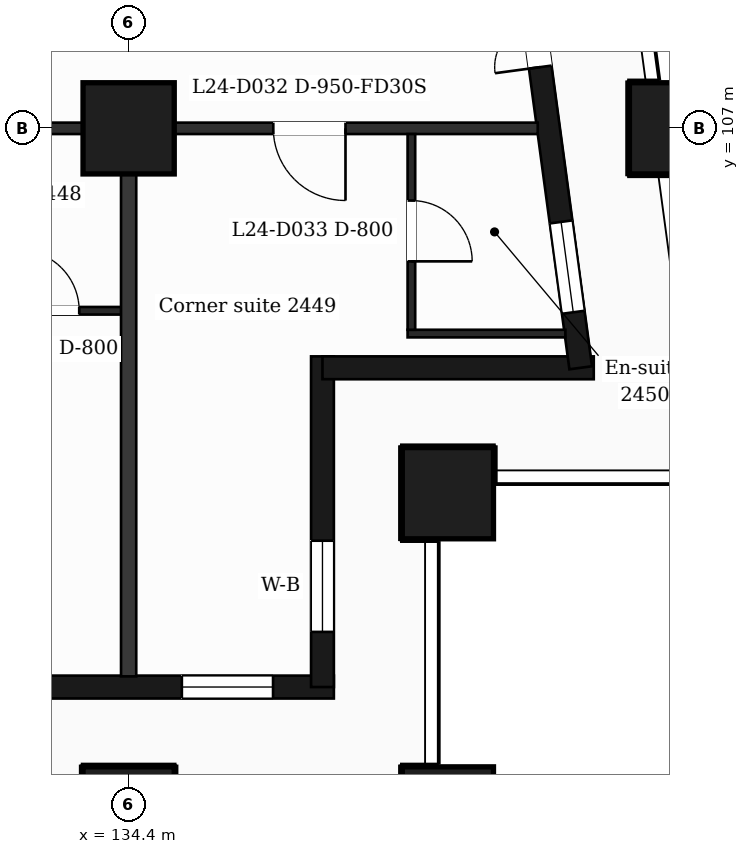
"""IFC4 building model, lengths in metres.
Left out: names, types, materials, properties, quantities, classifications, styles, units other than length and angle.
Written with IfcOpenShell. Run it as: python <this file> out.ifc"""

import sys

from ifc_helpers import new_model, si_unit, direction, frame, frame_2d, origin, origin_2d, place, context, subcontext, project, spatial, rectangle, extrude, element, fill, save


model = new_model("IFC4")
c1 = context("Model", 3, precision=1e-05, world=origin(), true_north=direction((0.0, 1.0)))
c2 = subcontext(c1, "Body", "Model", "MODEL_VIEW")
j1 = project(units=[si_unit("LENGTHUNIT", "METRE"), si_unit("PLANEANGLEUNIT", "RADIAN")], contexts=[c1])
p1 = place(None, origin())
s1 = spatial("IfcSite", under=j1, at=p1, CompositionType="ELEMENT")
p2 = place(p1, origin())
s2 = spatial("IfcBuilding", under=s1, at=p2, CompositionType="ELEMENT")
p3 = place(p2, frame((0.0, 0.0, 105.8)))
s3 = spatial("IfcBuildingStorey", under=s2, at=p3, CompositionType="ELEMENT", Elevation=105.8)
for number, where, z_axis, x_axis in (
    (1, (134.4, 98.0, 0.0), (0.0, 0.0, 1.0), (1.0, 0.0, 0.0)),
    (2, (138.6, 98.0, 0.0), (0.0, 0.0, 1.0), (1.0, 0.0, 0.0)),
    (3, (138.6, 102.2, 0.0), (0.0, 0.0, 1.0), (1.0, 0.0, 0.0)),
    (4, (134.4, 107.0, 0.0), (0.0, 0.0, 1.0), (1.0, 0.0, 0.0)),
    (5, (141.588, 107.0, 0.0), (0.0, 0.0, 1.0), (1.0, 0.0, 0.0)),
):
    element("IfcColumn", number, at=place(p3, frame(where, z_axis=z_axis, x_axis=x_axis)), inside=s3, PredefinedType="COLUMN", context=c2, shape_type="SweptSolid", body=[
        extrude(rectangle(XDim=1.2, YDim=1.2, at=origin_2d()), origin(), (0.0, 0.0, 1.0), 3.7),
    ])
p4 = place(p3, frame((89.85, 99.65, 0.0), z_axis=(0.0, 0.0, 1.0), x_axis=(1.0, 0.0, 0.0)))
e6 = element("IfcWall", 6, at=p4, inside=s3, PredefinedType="SOLIDWALL", context=c2, shape_type="SweptSolid", body=[
    extrude(rectangle(XDim=47.25, YDim=0.3, at=frame_2d((23.625, 0.0))), origin(), (0.0, 0.0, 1.0), 3.38),
])
p5 = place(p4, frame((0.725, 0.0, 0.9)))
e7 = element("IfcOpeningElement", 7, at=p5, cuts=e6, PredefinedType="OPENING", context=c2, shape_type="SweptSolid", body=[
    extrude(rectangle(XDim=1.2, YDim=2.1, at=frame_2d((0.6, 1.05))), frame((0.0, 0.16, 0.0), z_axis=(0.0, -1.0, 0.0), x_axis=(1.0, 0.0, 0.0)), (0.0, 0.0, 1.0), 0.32),
])
p6 = place(p4, frame((3.45, 0.0, 0.9)))
e8 = element("IfcOpeningElement", 8, at=p6, cuts=e6, PredefinedType="OPENING", context=c2, shape_type="SweptSolid", body=[
    extrude(rectangle(XDim=2.4, YDim=2.1, at=frame_2d((1.2, 1.05))), frame((0.0, 0.16, 0.0), z_axis=(0.0, -1.0, 0.0), x_axis=(1.0, 0.0, 0.0)), (0.0, 0.0, 1.0), 0.32),
])
p7 = place(p4, frame((7.65, 0.0, 0.9)))
e9 = element("IfcOpeningElement", 9, at=p7, cuts=e6, PredefinedType="OPENING", context=c2, shape_type="SweptSolid", body=[
    extrude(rectangle(XDim=2.4, YDim=2.1, at=frame_2d((1.2, 1.05))), frame((0.0, 0.16, 0.0), z_axis=(0.0, -1.0, 0.0), x_axis=(1.0, 0.0, 0.0)), (0.0, 0.0, 1.0), 0.32),
])
p8 = place(p4, frame((12.45, 0.0, 0.9)))
e10 = element("IfcOpeningElement", 10, at=p8, cuts=e6, PredefinedType="OPENING", context=c2, shape_type="SweptSolid", body=[
    extrude(rectangle(XDim=1.2, YDim=2.1, at=frame_2d((0.6, 1.05))), frame((0.0, 0.16, 0.0), z_axis=(0.0, -1.0, 0.0), x_axis=(1.0, 0.0, 0.0)), (0.0, 0.0, 1.0), 0.32),
])
p9 = place(p4, frame((16.65, 0.0, 0.9)))
e11 = element("IfcOpeningElement", 11, at=p9, cuts=e6, PredefinedType="OPENING", context=c2, shape_type="SweptSolid", body=[
    extrude(rectangle(XDim=1.2, YDim=2.1, at=frame_2d((0.6, 1.05))), frame((0.0, 0.16, 0.0), z_axis=(0.0, -1.0, 0.0), x_axis=(1.0, 0.0, 0.0)), (0.0, 0.0, 1.0), 0.32),
])
p10 = place(p4, frame((19.95, 0.0, 0.0)))
e12 = element("IfcOpeningElement", 12, at=p10, cuts=e6, PredefinedType="OPENING", context=c2, shape_type="SweptSolid", body=[
    extrude(rectangle(XDim=1.2, YDim=2.4, at=frame_2d((0.6, 1.2))), frame((0.0, 0.16, 0.0), z_axis=(0.0, -1.0, 0.0), x_axis=(1.0, 0.0, 0.0)), (0.0, 0.0, 1.0), 0.32),
])
p11 = place(p4, frame((21.75, 0.0, 0.9)))
e13 = element("IfcOpeningElement", 13, at=p11, cuts=e6, PredefinedType="OPENING", context=c2, shape_type="SweptSolid", body=[
    extrude(rectangle(XDim=1.2, YDim=2.1, at=frame_2d((0.6, 1.05))), frame((0.0, 0.16, 0.0), z_axis=(0.0, -1.0, 0.0), x_axis=(1.0, 0.0, 0.0)), (0.0, 0.0, 1.0), 0.32),
])
p12 = place(p4, frame((24.45, 0.0, 0.9)))
e14 = element("IfcOpeningElement", 14, at=p12, cuts=e6, PredefinedType="OPENING", context=c2, shape_type="SweptSolid", body=[
    extrude(rectangle(XDim=2.4, YDim=2.1, at=frame_2d((1.2, 1.05))), frame((0.0, 0.16, 0.0), z_axis=(0.0, -1.0, 0.0), x_axis=(1.0, 0.0, 0.0)), (0.0, 0.0, 1.0), 0.32),
])
p13 = place(p4, frame((28.35, 0.0, 0.0)))
e15 = element("IfcOpeningElement", 15, at=p13, cuts=e6, PredefinedType="OPENING", context=c2, shape_type="SweptSolid", body=[
    extrude(rectangle(XDim=1.2, YDim=2.4, at=frame_2d((0.6, 1.2))), frame((0.0, 0.16, 0.0), z_axis=(0.0, -1.0, 0.0), x_axis=(1.0, 0.0, 0.0)), (0.0, 0.0, 1.0), 0.32),
])
p14 = place(p4, frame((30.15, 0.0, 0.9)))
e16 = element("IfcOpeningElement", 16, at=p14, cuts=e6, PredefinedType="OPENING", context=c2, shape_type="SweptSolid", body=[
    extrude(rectangle(XDim=1.2, YDim=2.1, at=frame_2d((0.6, 1.05))), frame((0.0, 0.16, 0.0), z_axis=(0.0, -1.0, 0.0), x_axis=(1.0, 0.0, 0.0)), (0.0, 0.0, 1.0), 0.32),
])
p15 = place(p4, frame((32.85, 0.0, 0.9)))
e17 = element("IfcOpeningElement", 17, at=p15, cuts=e6, PredefinedType="OPENING", context=c2, shape_type="SweptSolid", body=[
    extrude(rectangle(XDim=2.4, YDim=2.1, at=frame_2d((1.2, 1.05))), frame((0.0, 0.16, 0.0), z_axis=(0.0, -1.0, 0.0), x_axis=(1.0, 0.0, 0.0)), (0.0, 0.0, 1.0), 0.32),
])
p16 = place(p4, frame((37.05, 0.0, 0.9)))
e18 = element("IfcOpeningElement", 18, at=p16, cuts=e6, PredefinedType="OPENING", context=c2, shape_type="SweptSolid", body=[
    extrude(rectangle(XDim=2.4, YDim=2.1, at=frame_2d((1.2, 1.05))), frame((0.0, 0.16, 0.0), z_axis=(0.0, -1.0, 0.0), x_axis=(1.0, 0.0, 0.0)), (0.0, 0.0, 1.0), 0.32),
])
p17 = place(p4, frame((41.85, 0.0, 0.9)))
e19 = element("IfcOpeningElement", 19, at=p17, cuts=e6, PredefinedType="OPENING", context=c2, shape_type="SweptSolid", body=[
    extrude(rectangle(XDim=1.2, YDim=2.1, at=frame_2d((0.6, 1.05))), frame((0.0, 0.16, 0.0), z_axis=(0.0, -1.0, 0.0), x_axis=(1.0, 0.0, 0.0)), (0.0, 0.0, 1.0), 0.32),
])
p18 = place(p4, frame((45.25, 0.0, 0.9)))
e20 = element("IfcOpeningElement", 20, at=p18, cuts=e6, PredefinedType="OPENING", context=c2, shape_type="SweptSolid", body=[
    extrude(rectangle(XDim=1.2, YDim=2.1, at=frame_2d((0.6, 1.05))), frame((0.0, 0.16, 0.0), z_axis=(0.0, -1.0, 0.0), x_axis=(1.0, 0.0, 0.0)), (0.0, 0.0, 1.0), 0.32),
])
p19 = place(p3, frame((136.95, 99.65, 0.0), z_axis=(0.0, 0.0, 1.0), x_axis=(0.0, 1.0, 0.0)))
e21 = element("IfcWall", 21, at=p19, inside=s3, PredefinedType="SOLIDWALL", context=c2, shape_type="SweptSolid", body=[
    extrude(rectangle(XDim=4.35, YDim=0.3, at=frame_2d((2.175, 0.0))), origin(), (0.0, 0.0, 1.0), 3.38),
])
p20 = place(p19, frame((0.725, 0.0, 0.9)))
e22 = element("IfcOpeningElement", 22, at=p20, cuts=e21, PredefinedType="OPENING", context=c2, shape_type="SweptSolid", body=[
    extrude(rectangle(XDim=1.2, YDim=2.1, at=frame_2d((0.6, 1.05))), frame((0.0, 0.16, 0.0), z_axis=(0.0, -1.0, 0.0), x_axis=(1.0, 0.0, 0.0)), (0.0, 0.0, 1.0), 0.32),
])
p21 = place(p3, frame((136.95, 103.85, 0.0), z_axis=(0.0, 0.0, 1.0), x_axis=(1.0, 0.0, 0.0)))
e23 = element("IfcWall", 23, at=p21, inside=s3, PredefinedType="SOLIDWALL", context=c2, shape_type="SweptSolid", body=[
    extrude(rectangle(XDim=3.569, YDim=0.3, at=frame_2d((1.785, 0.0))), origin(), (0.0, 0.0, 1.0), 3.38),
])
p22 = place(p3, frame((140.348, 103.85, 0.0), z_axis=(0.0, 0.0, 1.0), x_axis=(-0.133431549479, 0.991058031401, 0.0)))
e24 = element("IfcWall", 24, at=p22, inside=s3, PredefinedType="SOLIDWALL", context=c2, shape_type="SweptSolid", body=[
    extrude(rectangle(XDim=6.609, YDim=0.3, at=frame_2d((3.304, 0.0))), origin(), (0.0, 0.0, 1.0), 3.38),
])
p23 = place(p22, frame((0.737, 0.0, 0.9)))
e25 = element("IfcOpeningElement", 25, at=p23, cuts=e24, PredefinedType="OPENING", context=c2, shape_type="SweptSolid", body=[
    extrude(rectangle(XDim=1.2, YDim=2.1, at=frame_2d((0.6, 1.05))), frame((0.0, 0.16, 0.0), z_axis=(0.0, -1.0, 0.0), x_axis=(1.0, 0.0, 0.0)), (0.0, 0.0, 1.0), 0.32),
])
p24 = place(p22, frame((3.991, 0.0, 0.0)))
e26 = element("IfcOpeningElement", 26, at=p24, cuts=e24, PredefinedType="OPENING", context=c2, shape_type="SweptSolid", body=[
    extrude(rectangle(XDim=1.2, YDim=2.4, at=frame_2d((0.6, 1.2))), frame((0.0, 0.16, 0.0), z_axis=(0.0, -1.0, 0.0), x_axis=(1.0, 0.0, 0.0)), (0.0, 0.0, 1.0), 0.32),
])
p25 = place(p3, frame((138.07, 104.3, 0.0), z_axis=(0.0, 0.0, 1.0), x_axis=(1.0, 0.0, 0.0)))
e27 = element("IfcWall", 27, at=p25, inside=s3, PredefinedType="PARTITIONING", context=c2, shape_type="SweptSolid", body=[
    extrude(rectangle(XDim=2.076, YDim=0.1, at=frame_2d((1.038, 0.0))), origin(), (0.0, 0.0, 1.0), 3.38),
])
p26 = place(p3, frame((131.65, 104.6, 0.0), z_axis=(0.0, 0.0, 1.0), x_axis=(1.0, 0.0, 0.0)))
e28 = element("IfcWall", 28, at=p26, inside=s3, PredefinedType="PARTITIONING", context=c2, shape_type="SweptSolid", body=[
    extrude(rectangle(XDim=2.75, YDim=0.1, at=frame_2d((1.375, 0.0))), origin(), (0.0, 0.0, 1.0), 3.38),
])
p27 = place(p26, frame((1.3, 0.0, 0.0)))
e29 = element("IfcOpeningElement", 29, at=p27, cuts=e28, PredefinedType="OPENING", context=c2, shape_type="SweptSolid", body=[
    extrude(rectangle(XDim=0.8, YDim=2.1, at=frame_2d((0.4, 1.05))), frame((0.0, 0.06, 0.0), z_axis=(0.0, -1.0, 0.0), x_axis=(1.0, 0.0, 0.0)), (0.0, 0.0, 1.0), 0.12),
])
p28 = place(p3, frame((87.018, 107.0, 0.0), z_axis=(0.0, 0.0, 1.0), x_axis=(1.0, 0.0, 0.0)))
e30 = element("IfcWall", 30, at=p28, inside=s3, PredefinedType="PARTITIONING", context=c2, shape_type="SweptSolid", body=[
    extrude(rectangle(XDim=52.765, YDim=0.15, at=frame_2d((26.382, 0.0))), origin(), (0.0, 0.0, 1.0), 3.38),
])
p29 = place(p28, frame((1.276, 0.0, 0.0)))
e31 = element("IfcOpeningElement", 31, at=p29, cuts=e30, PredefinedType="OPENING", context=c2, shape_type="SweptSolid", body=[
    extrude(rectangle(XDim=0.95, YDim=2.1, at=frame_2d((0.475, 1.05))), frame((0.0, 0.085, 0.0), z_axis=(0.0, -1.0, 0.0), x_axis=(1.0, 0.0, 0.0)), (0.0, 0.0, 1.0), 0.17),
])
p30 = place(p28, frame((6.152, 0.0, 0.0)))
e32 = element("IfcOpeningElement", 32, at=p30, cuts=e30, PredefinedType="OPENING", context=c2, shape_type="SweptSolid", body=[
    extrude(rectangle(XDim=0.95, YDim=2.1, at=frame_2d((0.475, 1.05))), frame((0.0, 0.085, 0.0), z_axis=(0.0, -1.0, 0.0), x_axis=(1.0, 0.0, 0.0)), (0.0, 0.0, 1.0), 0.17),
])
p31 = place(p28, frame((14.59, 0.0, 0.0)))
e33 = element("IfcOpeningElement", 33, at=p31, cuts=e30, PredefinedType="OPENING", context=c2, shape_type="SweptSolid", body=[
    extrude(rectangle(XDim=0.95, YDim=2.1, at=frame_2d((0.475, 1.05))), frame((0.0, 0.085, 0.0), z_axis=(0.0, -1.0, 0.0), x_axis=(1.0, 0.0, 0.0)), (0.0, 0.0, 1.0), 0.17),
])
p32 = place(p28, frame((18.257, 0.0, 0.0)))
e34 = element("IfcOpeningElement", 34, at=p32, cuts=e30, PredefinedType="OPENING", context=c2, shape_type="SweptSolid", body=[
    extrude(rectangle(XDim=0.95, YDim=2.1, at=frame_2d((0.475, 1.05))), frame((0.0, 0.085, 0.0), z_axis=(0.0, -1.0, 0.0), x_axis=(1.0, 0.0, 0.0)), (0.0, 0.0, 1.0), 0.17),
])
p33 = place(p28, frame((26.672, 0.0, 0.0)))
e35 = element("IfcOpeningElement", 35, at=p33, cuts=e30, PredefinedType="OPENING", context=c2, shape_type="SweptSolid", body=[
    extrude(rectangle(XDim=0.95, YDim=2.1, at=frame_2d((0.475, 1.05))), frame((0.0, 0.085, 0.0), z_axis=(0.0, -1.0, 0.0), x_axis=(1.0, 0.0, 0.0)), (0.0, 0.0, 1.0), 0.17),
])
p34 = place(p28, frame((31.392, 0.0, 0.0)))
e36 = element("IfcOpeningElement", 36, at=p34, cuts=e30, PredefinedType="OPENING", context=c2, shape_type="SweptSolid", body=[
    extrude(rectangle(XDim=0.95, YDim=2.1, at=frame_2d((0.475, 1.05))), frame((0.0, 0.085, 0.0), z_axis=(0.0, -1.0, 0.0), x_axis=(1.0, 0.0, 0.0)), (0.0, 0.0, 1.0), 0.17),
])
p35 = place(p28, frame((37.182, 0.0, 0.0)))
e37 = element("IfcOpeningElement", 37, at=p35, cuts=e30, PredefinedType="OPENING", context=c2, shape_type="SweptSolid", body=[
    extrude(rectangle(XDim=0.95, YDim=2.1, at=frame_2d((0.475, 1.05))), frame((0.0, 0.085, 0.0), z_axis=(0.0, -1.0, 0.0), x_axis=(1.0, 0.0, 0.0)), (0.0, 0.0, 1.0), 0.17),
])
p36 = place(p28, frame((41.762, 0.0, 0.0)))
e38 = element("IfcOpeningElement", 38, at=p36, cuts=e30, PredefinedType="OPENING", context=c2, shape_type="SweptSolid", body=[
    extrude(rectangle(XDim=0.95, YDim=2.1, at=frame_2d((0.475, 1.05))), frame((0.0, 0.085, 0.0), z_axis=(0.0, -1.0, 0.0), x_axis=(1.0, 0.0, 0.0)), (0.0, 0.0, 1.0), 0.17),
])
p37 = place(p28, frame((49.285, 0.0, 0.0)))
e39 = element("IfcOpeningElement", 39, at=p37, cuts=e30, PredefinedType="OPENING", context=c2, shape_type="SweptSolid", body=[
    extrude(rectangle(XDim=0.95, YDim=2.1, at=frame_2d((0.475, 1.05))), frame((0.0, 0.085, 0.0), z_axis=(0.0, -1.0, 0.0), x_axis=(1.0, 0.0, 0.0)), (0.0, 0.0, 1.0), 0.17),
])
p38 = place(p3, frame((134.4, 99.79, 0.0), z_axis=(0.0, 0.0, 1.0), x_axis=(0.0, 1.0, 0.0)))
e40 = element("IfcWall", 40, at=p38, inside=s3, PredefinedType="PARTITIONING", context=c2, shape_type="SweptSolid", body=[
    extrude(rectangle(XDim=7.135, YDim=0.2, at=frame_2d((3.567, 0.0))), origin(), (0.0, 0.0, 1.0), 3.38),
])
p39 = place(p3, frame((138.12, 104.35, 0.0), z_axis=(0.0, 0.0, 1.0), x_axis=(0.0, 1.0, 0.0)))
e41 = element("IfcWall", 41, at=p39, inside=s3, PredefinedType="PARTITIONING", context=c2, shape_type="SweptSolid", body=[
    extrude(rectangle(XDim=2.575, YDim=0.1, at=frame_2d((1.288, 0.0))), origin(), (0.0, 0.0, 1.0), 3.38),
])
p40 = place(p39, frame((0.9, 0.0, 0.0)))
e42 = element("IfcOpeningElement", 42, at=p40, cuts=e41, PredefinedType="OPENING", context=c2, shape_type="SweptSolid", body=[
    extrude(rectangle(XDim=0.8, YDim=2.1, at=frame_2d((0.4, 1.05))), frame((0.0, 0.06, 0.0), z_axis=(0.0, -1.0, 0.0), x_axis=(1.0, 0.0, 0.0)), (0.0, 0.0, 1.0), 0.12),
])
p41 = place(p18, origin())
e43 = element("IfcWindow", 43, at=p41, inside=s3, PartitioningType="SINGLE_PANEL", PredefinedType="WINDOW", context=c2, shape_type="SweptSolid", body=[
    extrude(rectangle(XDim=1.2, YDim=2.1, at=frame_2d((0.6, 1.05))), frame((0.0, 0.03, 0.0), z_axis=(0.0, -1.0, 0.0), x_axis=(1.0, 0.0, 0.0)), (0.0, 0.0, 1.0), 0.06),
])
fill(e20, e43)
p42 = place(p20, origin())
e44 = element("IfcWindow", 44, at=p42, inside=s3, PartitioningType="SINGLE_PANEL", PredefinedType="WINDOW", context=c2, shape_type="SweptSolid", body=[
    extrude(rectangle(XDim=1.2, YDim=2.1, at=frame_2d((0.6, 1.05))), frame((0.0, 0.03, 0.0), z_axis=(0.0, -1.0, 0.0), x_axis=(1.0, 0.0, 0.0)), (0.0, 0.0, 1.0), 0.06),
])
fill(e22, e44)
p43 = place(p23, origin())
e45 = element("IfcWindow", 45, at=p43, inside=s3, PartitioningType="SINGLE_PANEL", PredefinedType="WINDOW", context=c2, shape_type="SweptSolid", body=[
    extrude(rectangle(XDim=1.2, YDim=2.1, at=frame_2d((0.6, 1.05))), frame((0.0, 0.03, 0.0), z_axis=(0.0, -1.0, 0.0), x_axis=(1.0, 0.0, 0.0)), (0.0, 0.0, 1.0), 0.06),
])
fill(e25, e45)
p44 = place(p24, origin())
e46 = element("IfcDoor", 46, at=p44, inside=s3, OperationType="DOUBLE_DOOR_SINGLE_SWING", PredefinedType="DOOR", context=c2, shape_type="SweptSolid", body=[
    extrude(rectangle(XDim=1.2, YDim=2.4, at=frame_2d((0.6, 1.2))), frame((0.0, 0.025, 0.0), z_axis=(0.0, -1.0, 0.0), x_axis=(1.0, 0.0, 0.0)), (0.0, 0.0, 1.0), 0.05),
])
fill(e26, e46)
p45 = place(p27, origin())
e47 = element("IfcDoor", 47, at=p45, inside=s3, OperationType="SINGLE_SWING_LEFT", PredefinedType="DOOR", context=c2, shape_type="SweptSolid", body=[
    extrude(rectangle(XDim=0.8, YDim=2.1, at=frame_2d((0.4, 1.05))), frame((0.0, 0.025, 0.0), z_axis=(0.0, -1.0, 0.0), x_axis=(1.0, 0.0, 0.0)), (0.0, 0.0, 1.0), 0.05),
])
fill(e29, e47)
p46 = place(p37, origin())
e48 = element("IfcDoor", 48, at=p46, inside=s3, OperationType="SINGLE_SWING_RIGHT", PredefinedType="DOOR", context=c2, shape_type="SweptSolid", body=[
    extrude(rectangle(XDim=0.95, YDim=2.1, at=frame_2d((0.475, 1.05))), frame((0.0, 0.025, 0.0), z_axis=(0.0, -1.0, 0.0), x_axis=(1.0, 0.0, 0.0)), (0.0, 0.0, 1.0), 0.05),
])
fill(e39, e48)
p47 = place(p40, origin())
e49 = element("IfcDoor", 49, at=p47, inside=s3, OperationType="SINGLE_SWING_LEFT", PredefinedType="DOOR", context=c2, shape_type="SweptSolid", body=[
    extrude(rectangle(XDim=0.8, YDim=2.1, at=frame_2d((0.4, 1.05))), frame((0.0, 0.025, 0.0), z_axis=(0.0, -1.0, 0.0), x_axis=(1.0, 0.0, 0.0)), (0.0, 0.0, 1.0), 0.05),
])
fill(e42, e49)
save(model, sys.argv[1])
